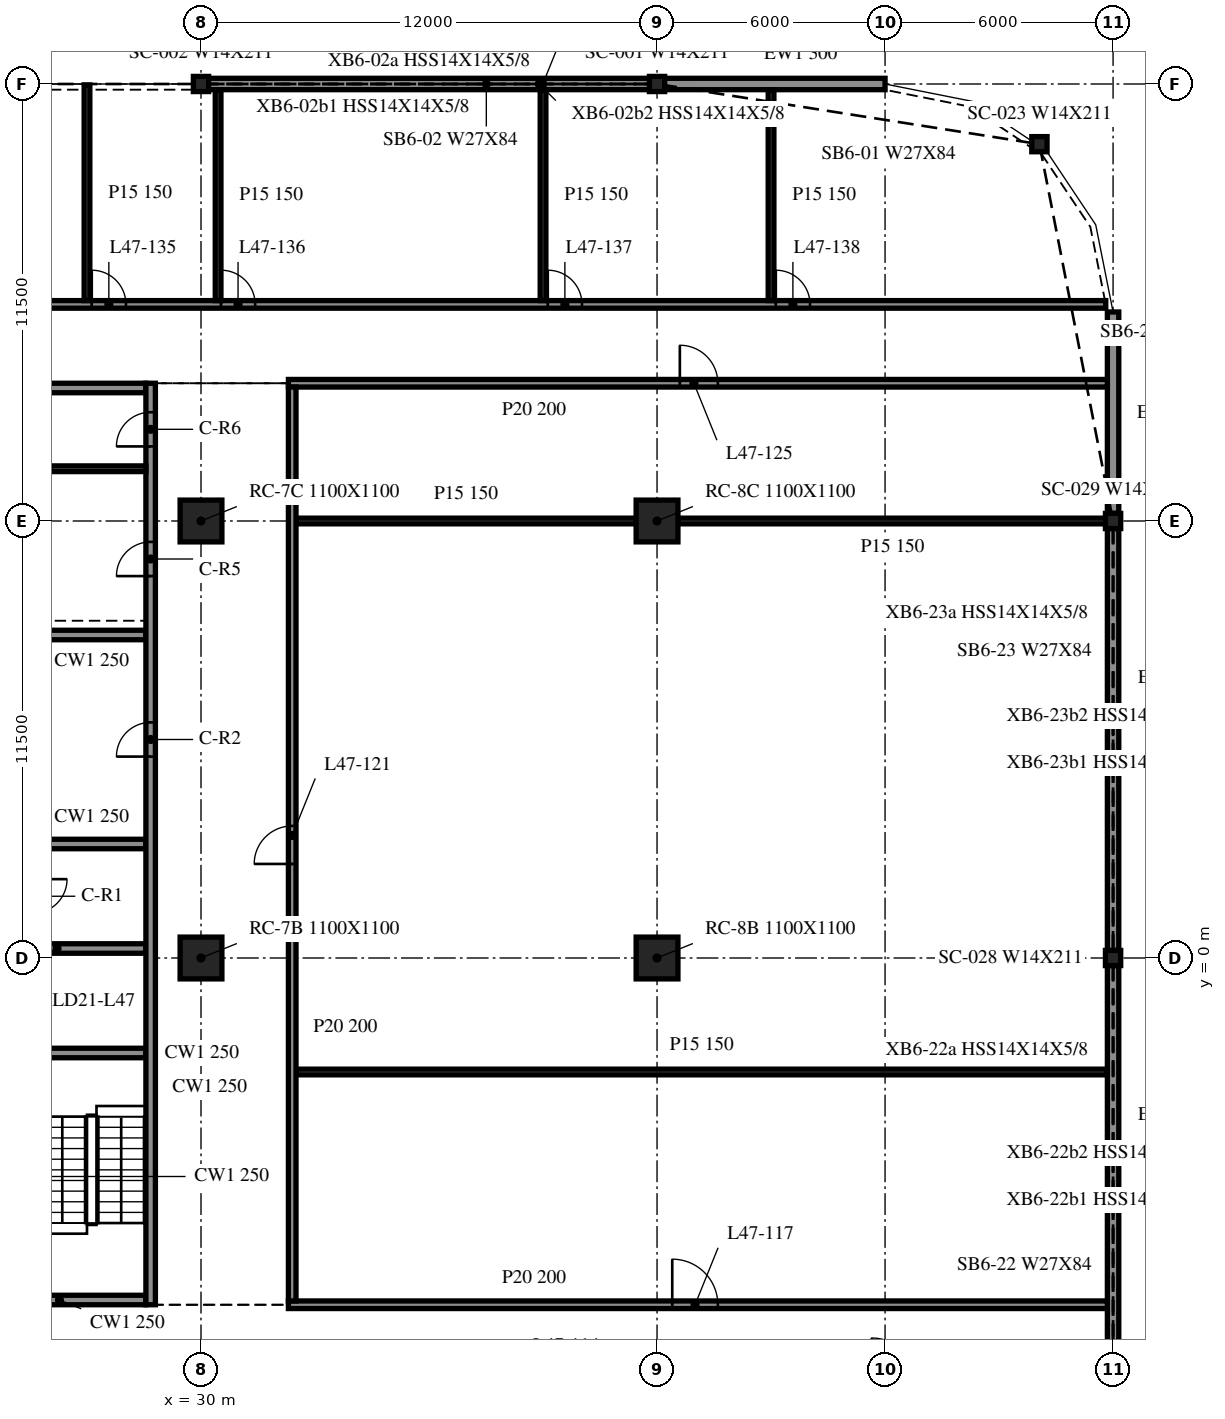
"""IFC4 building model, lengths in metres.
Left out: names, types, materials, properties, quantities, classifications, styles, units other than length and angle.
Written with IfcOpenShell. Run it as: python <this file> out.ifc"""

import sys

from ifc_helpers import new_model, si_unit, direction, frame, frame_2d, origin, origin_2d, place, context, subcontext, project, spatial, rectangle, i_section, extrude, element, fill, save


model = new_model("IFC4")
c1 = context("Model", 3, precision=1e-05, world=origin(), true_north=direction((0.0, 1.0)))
c2 = subcontext(c1, "Body", "Model", "MODEL_VIEW")
j1 = project(units=[si_unit("LENGTHUNIT", "METRE"), si_unit("PLANEANGLEUNIT", "RADIAN")], contexts=[c1])
p1 = place(None, origin())
s1 = spatial("IfcSite", under=j1, at=p1, CompositionType="ELEMENT")
p2 = place(p1, origin())
s2 = spatial("IfcBuilding", under=s1, at=p2, CompositionType="ELEMENT")
p3 = place(p2, frame((0.0, 0.0, 197.7)))
s3 = spatial("IfcBuildingStorey", under=s2, at=p3, CompositionType="ELEMENT", Elevation=197.7)
for number, where, z_axis, x_axis in (
    (1, (30.0, 0.0, -0.34), (0.0, 0.0, 1.0), (1.0, 0.0, 0.0)),
    (2, (30.0, 11.5, -0.34), (0.0, 0.0, 1.0), (1.0, 0.0, 0.0)),
    (3, (42.0, 0.0, -0.34), (0.0, 0.0, 1.0), (1.0, 0.0, 0.0)),
    (4, (42.0, 11.5, -0.34), (0.0, 0.0, 1.0), (1.0, 0.0, 0.0)),
):
    element("IfcColumn", number, at=place(p3, frame(where, z_axis=z_axis, x_axis=x_axis)), inside=s3, PredefinedType="COLUMN", context=c2, shape_type="SweptSolid", body=[
        extrude(rectangle(XDim=1.1, YDim=1.1, at=origin_2d()), origin(), (0.0, 0.0, 1.0), 3.8),
    ])
for number, where, z_axis, x_axis in (
    (5, (52.062, 21.416, -0.34), (0.0, 0.0, 1.0), (1.0, 0.0, 0.0)),
    (6, (42.0, 23.0, -0.34), (0.0, 0.0, 1.0), (1.0, 0.0, 0.0)),
    (7, (30.0, 23.0, -0.34), (0.0, 0.0, 1.0), (1.0, 0.0, 0.0)),
    (8, (54.0, 0.0, -0.34), (0.0, 0.0, 1.0), (1.0, 0.0, 0.0)),
    (9, (54.0, 11.5, -0.34), (0.0, 0.0, 1.0), (1.0, 0.0, 0.0)),
):
    element("IfcColumn", number, at=place(p3, frame(where, z_axis=z_axis, x_axis=x_axis)), inside=s3, PredefinedType="COLUMN", context=c2, shape_type="SweptSolid", body=[
        extrude(i_section(OverallWidth=0.401, OverallDepth=0.399, WebThickness=0.025, FlangeThickness=0.04, at=origin_2d()), origin(), (0.0, 0.0, 1.0), 3.8),
    ])
p4 = place(p3, frame((48.0, 23.0, 0.0), z_axis=(0.0, 0.0, 1.0), x_axis=(-1.0, 0.0, 0.0)))
e10 = element("IfcWall", 10, at=p4, inside=s3, PredefinedType="NOTDEFINED", context=c2, shape_type="SweptSolid", body=[
    extrude(rectangle(XDim=5.988, YDim=0.3, at=frame_2d((2.994, 0.0))), origin(), (0.0, 0.0, 1.0), 2.782),
])
p5 = place(p3, frame((41.988, 23.0, 0.0), z_axis=(0.0, 0.0, 1.0), x_axis=(-1.0, 0.0, 0.0)))
e11 = element("IfcWall", 11, at=p5, inside=s3, PredefinedType="NOTDEFINED", context=c2, shape_type="SweptSolid", body=[
    extrude(rectangle(XDim=11.975, YDim=0.3, at=frame_2d((5.988, 0.0))), origin(), (0.0, 0.0, 1.0), 2.782),
])
for number, where, z_axis, x_axis in (
    (12, (54.0, -11.3, 0.0), (0.0, 0.0, 1.0), (0.0, 1.0, 0.0)),
    (13, (54.0, 0.2, 0.0), (0.0, 0.0, 1.0), (0.0, 1.0, 0.0)),
):
    element("IfcWall", number, at=place(p3, frame(where, z_axis=z_axis, x_axis=x_axis)), inside=s3, PredefinedType="NOTDEFINED", context=c2, shape_type="SweptSolid", body=[
        extrude(rectangle(XDim=11.1, YDim=0.3, at=frame_2d((5.55, 0.0))), origin(), (0.0, 0.0, 1.0), 2.782),
    ])
p6 = place(p3, frame((54.0, 11.7, 0.0), z_axis=(0.0, 0.0, 1.0), x_axis=(0.0, 1.0, 0.0)))
e14 = element("IfcWall", 14, at=p6, inside=s3, PredefinedType="NOTDEFINED", context=c2, shape_type="SweptSolid", body=[
    extrude(rectangle(XDim=5.3, YDim=0.3, at=frame_2d((2.65, 0.0))), origin(), (0.0, 0.0, 1.0), 2.782),
])
p7 = place(p3, frame((28.675, -9.125, 0.0), z_axis=(0.0, 0.0, 1.0), x_axis=(0.0, 1.0, 0.0)))
e15 = element("IfcWall", 15, at=p7, inside=s3, PredefinedType="SOLIDWALL", context=c2, shape_type="SweptSolid", body=[
    extrude(rectangle(XDim=24.25, YDim=0.25, at=frame_2d((12.125, 0.0))), origin(), (0.0, 0.0, 1.0), 3.46),
])
p8 = place(p7, frame((14.425, 0.0, 0.0)))
e16 = element("IfcOpeningElement", 16, at=p8, cuts=e15, PredefinedType="OPENING", context=c2, shape_type="SweptSolid", body=[
    extrude(rectangle(XDim=0.9, YDim=2.1, at=frame_2d((0.45, 1.05))), frame((0.0, 0.135, 0.0), z_axis=(0.0, -1.0, 0.0), x_axis=(1.0, 0.0, 0.0)), (0.0, 0.0, 1.0), 0.27),
])
p9 = place(p7, frame((19.175, 0.0, 0.0)))
e17 = element("IfcOpeningElement", 17, at=p9, cuts=e15, PredefinedType="OPENING", context=c2, shape_type="SweptSolid", body=[
    extrude(rectangle(XDim=0.9, YDim=2.1, at=frame_2d((0.45, 1.05))), frame((0.0, 0.135, 0.0), z_axis=(0.0, -1.0, 0.0), x_axis=(1.0, 0.0, 0.0)), (0.0, 0.0, 1.0), 0.27),
])
p10 = place(p7, frame((22.587, 0.0, 0.0)))
e18 = element("IfcOpeningElement", 18, at=p10, cuts=e15, PredefinedType="OPENING", context=c2, shape_type="SweptSolid", body=[
    extrude(rectangle(XDim=0.9, YDim=2.1, at=frame_2d((0.45, 1.05))), frame((0.0, 0.135, 0.0), z_axis=(0.0, -1.0, 0.0), x_axis=(1.0, 0.0, 0.0)), (0.0, 0.0, 1.0), 0.27),
])
p11 = place(p3, frame((28.55, -9.0, 0.0), z_axis=(0.0, 0.0, 1.0), x_axis=(-1.0, 0.0, 0.0)))
e19 = element("IfcWall", 19, at=p11, inside=s3, PredefinedType="SOLIDWALL", context=c2, shape_type="SweptSolid", body=[
    extrude(rectangle(XDim=9.1, YDim=0.25, at=frame_2d((4.55, 0.0))), origin(), (0.0, 0.0, 1.0), 3.46),
])
p12 = place(p11, frame((3.65, 0.0, 0.0)))
e20 = element("IfcOpeningElement", 20, at=p12, cuts=e19, PredefinedType="OPENING", context=c2, shape_type="SweptSolid", body=[
    extrude(rectangle(XDim=1.8, YDim=2.1, at=frame_2d((0.9, 1.05))), frame((0.0, 0.135, 0.0), z_axis=(0.0, -1.0, 0.0), x_axis=(1.0, 0.0, 0.0)), (0.0, 0.0, 1.0), 0.27),
])
p13 = place(p3, frame((19.45, 15.0, 0.0), z_axis=(0.0, 0.0, 1.0), x_axis=(1.0, 0.0, 0.0)))
e21 = element("IfcWall", 21, at=p13, inside=s3, PredefinedType="SOLIDWALL", context=c2, shape_type="SweptSolid", body=[
    extrude(rectangle(XDim=9.1, YDim=0.25, at=frame_2d((4.55, 0.0))), origin(), (0.0, 0.0, 1.0), 3.46),
])
p14 = place(p13, frame((3.65, 0.0, 0.0)))
e22 = element("IfcOpeningElement", 22, at=p14, cuts=e21, PredefinedType="OPENING", context=c2, shape_type="SweptSolid", body=[
    extrude(rectangle(XDim=1.8, YDim=2.1, at=frame_2d((0.9, 1.05))), frame((0.0, 0.135, 0.0), z_axis=(0.0, -1.0, 0.0), x_axis=(1.0, 0.0, 0.0)), (0.0, 0.0, 1.0), 0.27),
])
for number, where, z_axis, x_axis in (
    (23, (25.7, -2.5, 0.0), (0.0, 0.0, 1.0), (1.0, 0.0, 0.0)),
    (24, (25.7, 0.25, 0.0), (0.0, 0.0, 1.0), (1.0, 0.0, 0.0)),
    (25, (25.7, 3.0, 0.0), (0.0, 0.0, 1.0), (1.0, 0.0, 0.0)),
    (26, (25.7, 8.5, 0.0), (0.0, 0.0, 1.0), (1.0, 0.0, 0.0)),
):
    element("IfcWall", number, at=place(p3, frame(where, z_axis=z_axis, x_axis=x_axis)), inside=s3, PredefinedType="SOLIDWALL", context=c2, shape_type="SweptSolid", body=[
        extrude(rectangle(XDim=2.85, YDim=0.25, at=frame_2d((1.425, 0.0))), origin(), (0.0, 0.0, 1.0), 3.46),
    ])
p15 = place(p3, frame((25.7, 12.875, 0.0), z_axis=(0.0, 0.0, 1.0), x_axis=(1.0, 0.0, 0.0)))
e27 = element("IfcWall", 27, at=p15, inside=s3, PredefinedType="PARTITIONING", context=c2, shape_type="SweptSolid", body=[
    extrude(rectangle(XDim=2.85, YDim=0.15, at=frame_2d((1.425, 0.0))), origin(), (0.0, 0.0, 1.0), 3.46),
])
p16 = place(p3, frame((32.3, -9.125, 0.0), z_axis=(0.0, 0.0, 1.0), x_axis=(1.0, 0.0, 0.0)))
e28 = element("IfcWall", 28, at=p16, inside=s3, PredefinedType="PARTITIONING", context=c2, shape_type="SweptSolid", body=[
    extrude(rectangle(XDim=21.55, YDim=0.2, at=frame_2d((10.775, 0.0))), origin(), (0.0, 0.0, 1.0), 3.46),
])
p17 = place(p16, frame((10.1, 0.0, 0.0)))
e29 = element("IfcOpeningElement", 29, at=p17, cuts=e28, PredefinedType="OPENING", context=c2, shape_type="SweptSolid", body=[
    extrude(rectangle(XDim=1.2, YDim=2.1, at=frame_2d((0.6, 1.05))), frame((0.0, 0.11, 0.0), z_axis=(0.0, -1.0, 0.0), x_axis=(1.0, 0.0, 0.0)), (0.0, 0.0, 1.0), 0.22),
])
p18 = place(p3, frame((32.5, -3.0, 0.0), z_axis=(0.0, 0.0, 1.0), x_axis=(1.0, 0.0, 0.0)))
e30 = element("IfcWall", 30, at=p18, inside=s3, PredefinedType="PARTITIONING", context=c2, shape_type="SweptSolid", body=[
    extrude(rectangle(XDim=21.35, YDim=0.15, at=frame_2d((10.675, 0.0))), origin(), (0.0, 0.0, 1.0), 3.46),
])
p19 = place(p3, frame((32.5, 11.5, 0.0), z_axis=(0.0, 0.0, 1.0), x_axis=(1.0, 0.0, 0.0)))
e31 = element("IfcWall", 31, at=p19, inside=s3, PredefinedType="PARTITIONING", context=c2, shape_type="SweptSolid", body=[
    extrude(rectangle(XDim=8.95, YDim=0.15, at=frame_2d((4.475, 0.0))), origin(), (0.0, 0.0, 1.0), 3.46),
])
p20 = place(p3, frame((42.55, 11.5, 0.0), z_axis=(0.0, 0.0, 1.0), x_axis=(1.0, 0.0, 0.0)))
e32 = element("IfcWall", 32, at=p20, inside=s3, PredefinedType="PARTITIONING", context=c2, shape_type="SweptSolid", body=[
    extrude(rectangle(XDim=11.3, YDim=0.15, at=frame_2d((5.65, 0.0))), origin(), (0.0, 0.0, 1.0), 3.46),
])
p21 = place(p3, frame((32.3, 15.125, 0.0), z_axis=(0.0, 0.0, 1.0), x_axis=(1.0, 0.0, 0.0)))
e33 = element("IfcWall", 33, at=p21, inside=s3, PredefinedType="PARTITIONING", context=c2, shape_type="SweptSolid", body=[
    extrude(rectangle(XDim=21.55, YDim=0.2, at=frame_2d((10.775, 0.0))), origin(), (0.0, 0.0, 1.0), 3.46),
])
p22 = place(p21, frame((10.3, 0.0, 0.0)))
e34 = element("IfcOpeningElement", 34, at=p22, cuts=e33, PredefinedType="OPENING", context=c2, shape_type="SweptSolid", body=[
    extrude(rectangle(XDim=1.0, YDim=2.1, at=frame_2d((0.5, 1.05))), frame((0.0, 0.11, 0.0), z_axis=(0.0, -1.0, 0.0), x_axis=(1.0, 0.0, 0.0)), (0.0, 0.0, 1.0), 0.22),
])
p23 = place(p3, frame((-41.975, 17.2, 0.0), z_axis=(0.0, 0.0, 1.0), x_axis=(1.0, 0.0, 0.0)))
e35 = element("IfcWall", 35, at=p23, inside=s3, PredefinedType="PARTITIONING", context=c2, shape_type="SweptSolid", body=[
    extrude(rectangle(XDim=95.782, YDim=0.2, at=frame_2d((47.891, 0.0))), origin(), (0.0, 0.0, 1.0), 3.46),
])
p24 = place(p23, frame((7.7, 0.0, 0.0)))
e36 = element("IfcOpeningElement", 36, at=p24, cuts=e35, PredefinedType="OPENING", context=c2, shape_type="SweptSolid", body=[
    extrude(rectangle(XDim=0.9, YDim=2.1, at=frame_2d((0.45, 1.05))), frame((0.0, 0.11, 0.0), z_axis=(0.0, -1.0, 0.0), x_axis=(1.0, 0.0, 0.0)), (0.0, 0.0, 1.0), 0.22),
])
p25 = place(p23, frame((13.7, 0.0, 0.0)))
e37 = element("IfcOpeningElement", 37, at=p25, cuts=e35, PredefinedType="OPENING", context=c2, shape_type="SweptSolid", body=[
    extrude(rectangle(XDim=0.9, YDim=2.1, at=frame_2d((0.45, 1.05))), frame((0.0, 0.11, 0.0), z_axis=(0.0, -1.0, 0.0), x_axis=(1.0, 0.0, 0.0)), (0.0, 0.0, 1.0), 0.22),
])
p26 = place(p23, frame((19.7, 0.0, 0.0)))
e38 = element("IfcOpeningElement", 38, at=p26, cuts=e35, PredefinedType="OPENING", context=c2, shape_type="SweptSolid", body=[
    extrude(rectangle(XDim=0.9, YDim=2.1, at=frame_2d((0.45, 1.05))), frame((0.0, 0.11, 0.0), z_axis=(0.0, -1.0, 0.0), x_axis=(1.0, 0.0, 0.0)), (0.0, 0.0, 1.0), 0.22),
])
p27 = place(p23, frame((31.7, 0.0, 0.0)))
e39 = element("IfcOpeningElement", 39, at=p27, cuts=e35, PredefinedType="OPENING", context=c2, shape_type="SweptSolid", body=[
    extrude(rectangle(XDim=0.9, YDim=2.1, at=frame_2d((0.45, 1.05))), frame((0.0, 0.11, 0.0), z_axis=(0.0, -1.0, 0.0), x_axis=(1.0, 0.0, 0.0)), (0.0, 0.0, 1.0), 0.22),
])
p28 = place(p23, frame((35.1, 0.0, 0.0)))
e40 = element("IfcOpeningElement", 40, at=p28, cuts=e35, PredefinedType="OPENING", context=c2, shape_type="SweptSolid", body=[
    extrude(rectangle(XDim=0.9, YDim=2.1, at=frame_2d((0.45, 1.05))), frame((0.0, 0.11, 0.0), z_axis=(0.0, -1.0, 0.0), x_axis=(1.0, 0.0, 0.0)), (0.0, 0.0, 1.0), 0.22),
])
p29 = place(p23, frame((43.7, 0.0, 0.0)))
e41 = element("IfcOpeningElement", 41, at=p29, cuts=e35, PredefinedType="OPENING", context=c2, shape_type="SweptSolid", body=[
    extrude(rectangle(XDim=0.9, YDim=2.1, at=frame_2d((0.45, 1.05))), frame((0.0, 0.11, 0.0), z_axis=(0.0, -1.0, 0.0), x_axis=(1.0, 0.0, 0.0)), (0.0, 0.0, 1.0), 0.22),
])
p30 = place(p23, frame((47.3, 0.0, 0.0)))
e42 = element("IfcOpeningElement", 42, at=p30, cuts=e35, PredefinedType="OPENING", context=c2, shape_type="SweptSolid", body=[
    extrude(rectangle(XDim=0.9, YDim=2.1, at=frame_2d((0.45, 1.05))), frame((0.0, 0.11, 0.0), z_axis=(0.0, -1.0, 0.0), x_axis=(1.0, 0.0, 0.0)), (0.0, 0.0, 1.0), 0.22),
])
p31 = place(p23, frame((51.5, 0.0, 0.0)))
e43 = element("IfcOpeningElement", 43, at=p31, cuts=e35, PredefinedType="OPENING", context=c2, shape_type="SweptSolid", body=[
    extrude(rectangle(XDim=0.9, YDim=2.1, at=frame_2d((0.45, 1.05))), frame((0.0, 0.11, 0.0), z_axis=(0.0, -1.0, 0.0), x_axis=(1.0, 0.0, 0.0)), (0.0, 0.0, 1.0), 0.22),
])
p32 = place(p23, frame((57.1, 0.0, 0.0)))
e44 = element("IfcOpeningElement", 44, at=p32, cuts=e35, PredefinedType="OPENING", context=c2, shape_type="SweptSolid", body=[
    extrude(rectangle(XDim=0.9, YDim=2.1, at=frame_2d((0.45, 1.05))), frame((0.0, 0.11, 0.0), z_axis=(0.0, -1.0, 0.0), x_axis=(1.0, 0.0, 0.0)), (0.0, 0.0, 1.0), 0.22),
])
p33 = place(p23, frame((69.1, 0.0, 0.0)))
e45 = element("IfcOpeningElement", 45, at=p33, cuts=e35, PredefinedType="OPENING", context=c2, shape_type="SweptSolid", body=[
    extrude(rectangle(XDim=0.9, YDim=2.1, at=frame_2d((0.45, 1.05))), frame((0.0, 0.11, 0.0), z_axis=(0.0, -1.0, 0.0), x_axis=(1.0, 0.0, 0.0)), (0.0, 0.0, 1.0), 0.22),
])
p34 = place(p23, frame((72.5, 0.0, 0.0)))
e46 = element("IfcOpeningElement", 46, at=p34, cuts=e35, PredefinedType="OPENING", context=c2, shape_type="SweptSolid", body=[
    extrude(rectangle(XDim=0.9, YDim=2.1, at=frame_2d((0.45, 1.05))), frame((0.0, 0.11, 0.0), z_axis=(0.0, -1.0, 0.0), x_axis=(1.0, 0.0, 0.0)), (0.0, 0.0, 1.0), 0.22),
])
p35 = place(p23, frame((81.1, 0.0, 0.0)))
e47 = element("IfcOpeningElement", 47, at=p35, cuts=e35, PredefinedType="OPENING", context=c2, shape_type="SweptSolid", body=[
    extrude(rectangle(XDim=0.9, YDim=2.1, at=frame_2d((0.45, 1.05))), frame((0.0, 0.11, 0.0), z_axis=(0.0, -1.0, 0.0), x_axis=(1.0, 0.0, 0.0)), (0.0, 0.0, 1.0), 0.22),
])
p36 = place(p23, frame((87.1, 0.0, 0.0)))
e48 = element("IfcOpeningElement", 48, at=p36, cuts=e35, PredefinedType="OPENING", context=c2, shape_type="SweptSolid", body=[
    extrude(rectangle(XDim=0.9, YDim=2.1, at=frame_2d((0.45, 1.05))), frame((0.0, 0.11, 0.0), z_axis=(0.0, -1.0, 0.0), x_axis=(1.0, 0.0, 0.0)), (0.0, 0.0, 1.0), 0.22),
])
p37 = place(p3, frame((27.0, 17.3, 0.0), z_axis=(0.0, 0.0, 1.0), x_axis=(0.0, 1.0, 0.0)))
e49 = element("IfcWall", 49, at=p37, inside=s3, PredefinedType="PARTITIONING", context=c2, shape_type="SweptSolid", body=[
    extrude(rectangle(XDim=5.675, YDim=0.15, at=frame_2d((2.837, 0.0))), origin(), (0.0, 0.0, 1.0), 3.46),
])
p38 = place(p3, frame((30.45, 17.3, 0.0), z_axis=(0.0, 0.0, 1.0), x_axis=(0.0, 1.0, 0.0)))
e50 = element("IfcWall", 50, at=p38, inside=s3, PredefinedType="PARTITIONING", context=c2, shape_type="SweptSolid", body=[
    extrude(rectangle(XDim=5.55, YDim=0.15, at=frame_2d((2.775, 0.0))), origin(), (0.0, 0.0, 1.0), 3.46),
])
p39 = place(p3, frame((32.4, -9.025, 0.0), z_axis=(0.0, 0.0, 1.0), x_axis=(0.0, 1.0, 0.0)))
e51 = element("IfcWall", 51, at=p39, inside=s3, PredefinedType="PARTITIONING", context=c2, shape_type="SweptSolid", body=[
    extrude(rectangle(XDim=24.05, YDim=0.2, at=frame_2d((12.025, 0.0))), origin(), (0.0, 0.0, 1.0), 3.46),
])
p40 = place(p39, frame((11.5, 0.0, 0.0)))
e52 = element("IfcOpeningElement", 52, at=p40, cuts=e51, PredefinedType="OPENING", context=c2, shape_type="SweptSolid", body=[
    extrude(rectangle(XDim=1.0, YDim=2.1, at=frame_2d((0.5, 1.05))), frame((0.0, 0.11, 0.0), z_axis=(0.0, -1.0, 0.0), x_axis=(1.0, 0.0, 0.0)), (0.0, 0.0, 1.0), 0.22),
])
for number, where, z_axis, x_axis in (
    (53, (39.0, 17.3, 0.0), (0.0, 0.0, 1.0), (0.0, 1.0, 0.0)),
    (54, (45.0, 17.3, 0.0), (0.0, 0.0, 1.0), (0.0, 1.0, 0.0)),
):
    element("IfcWall", number, at=place(p3, frame(where, z_axis=z_axis, x_axis=x_axis)), inside=s3, PredefinedType="PARTITIONING", context=c2, shape_type="SweptSolid", body=[
        extrude(rectangle(XDim=5.55, YDim=0.15, at=frame_2d((2.775, 0.0))), origin(), (0.0, 0.0, 1.0), 3.46),
    ])
p41 = place(p8, origin())
e55 = element("IfcDoor", 55, at=p41, inside=s3, OperationType="SINGLE_SWING_RIGHT", PredefinedType="DOOR", context=c2, shape_type="SweptSolid", body=[
    extrude(rectangle(XDim=0.9, YDim=2.1, at=frame_2d((0.45, 1.05))), frame((0.0, 0.025, 0.0), z_axis=(0.0, -1.0, 0.0), x_axis=(1.0, 0.0, 0.0)), (0.0, 0.0, 1.0), 0.05),
])
fill(e16, e55)
p42 = place(p9, origin())
e56 = element("IfcDoor", 56, at=p42, inside=s3, OperationType="SINGLE_SWING_LEFT", PredefinedType="DOOR", context=c2, shape_type="SweptSolid", body=[
    extrude(rectangle(XDim=0.9, YDim=2.1, at=frame_2d((0.45, 1.05))), frame((0.0, 0.025, 0.0), z_axis=(0.0, -1.0, 0.0), x_axis=(1.0, 0.0, 0.0)), (0.0, 0.0, 1.0), 0.05),
])
fill(e17, e56)
p43 = place(p10, origin())
e57 = element("IfcDoor", 57, at=p43, inside=s3, OperationType="SINGLE_SWING_RIGHT", PredefinedType="DOOR", context=c2, shape_type="SweptSolid", body=[
    extrude(rectangle(XDim=0.9, YDim=2.1, at=frame_2d((0.45, 1.05))), frame((0.0, 0.025, 0.0), z_axis=(0.0, -1.0, 0.0), x_axis=(1.0, 0.0, 0.0)), (0.0, 0.0, 1.0), 0.05),
])
fill(e18, e57)
p44 = place(p17, origin())
e58 = element("IfcDoor", 58, at=p44, inside=s3, OperationType="SINGLE_SWING_LEFT", PredefinedType="DOOR", context=c2, shape_type="SweptSolid", body=[
    extrude(rectangle(XDim=1.2, YDim=2.1, at=frame_2d((0.6, 1.05))), frame((0.0, 0.025, 0.0), z_axis=(0.0, -1.0, 0.0), x_axis=(1.0, 0.0, 0.0)), (0.0, 0.0, 1.0), 0.05),
])
fill(e29, e58)
p45 = place(p40, origin())
e59 = element("IfcDoor", 59, at=p45, inside=s3, OperationType="SINGLE_SWING_RIGHT", PredefinedType="DOOR", context=c2, shape_type="SweptSolid", body=[
    extrude(rectangle(XDim=1.0, YDim=2.1, at=frame_2d((0.5, 1.05))), frame((0.0, 0.025, 0.0), z_axis=(0.0, -1.0, 0.0), x_axis=(1.0, 0.0, 0.0)), (0.0, 0.0, 1.0), 0.05),
])
fill(e52, e59)
p46 = place(p22, origin())
e60 = element("IfcDoor", 60, at=p46, inside=s3, OperationType="SINGLE_SWING_LEFT", PredefinedType="DOOR", context=c2, shape_type="SweptSolid", body=[
    extrude(rectangle(XDim=1.0, YDim=2.1, at=frame_2d((0.5, 1.05))), frame((0.0, 0.025, 0.0), z_axis=(0.0, -1.0, 0.0), x_axis=(1.0, 0.0, 0.0)), (0.0, 0.0, 1.0), 0.05),
])
fill(e34, e60)
p47 = place(p33, origin())
e61 = element("IfcDoor", 61, at=p47, inside=s3, OperationType="SINGLE_SWING_RIGHT", PredefinedType="DOOR", context=c2, shape_type="SweptSolid", body=[
    extrude(rectangle(XDim=0.9, YDim=2.1, at=frame_2d((0.45, 1.05))), frame((0.0, 0.025, 0.0), z_axis=(0.0, -1.0, 0.0), x_axis=(1.0, 0.0, 0.0)), (0.0, 0.0, 1.0), 0.05),
])
fill(e45, e61)
p48 = place(p34, origin())
e62 = element("IfcDoor", 62, at=p48, inside=s3, OperationType="SINGLE_SWING_RIGHT", PredefinedType="DOOR", context=c2, shape_type="SweptSolid", body=[
    extrude(rectangle(XDim=0.9, YDim=2.1, at=frame_2d((0.45, 1.05))), frame((0.0, 0.025, 0.0), z_axis=(0.0, -1.0, 0.0), x_axis=(1.0, 0.0, 0.0)), (0.0, 0.0, 1.0), 0.05),
])
fill(e46, e62)
p49 = place(p35, origin())
e63 = element("IfcDoor", 63, at=p49, inside=s3, OperationType="SINGLE_SWING_RIGHT", PredefinedType="DOOR", context=c2, shape_type="SweptSolid", body=[
    extrude(rectangle(XDim=0.9, YDim=2.1, at=frame_2d((0.45, 1.05))), frame((0.0, 0.025, 0.0), z_axis=(0.0, -1.0, 0.0), x_axis=(1.0, 0.0, 0.0)), (0.0, 0.0, 1.0), 0.05),
])
fill(e47, e63)
p50 = place(p36, origin())
e64 = element("IfcDoor", 64, at=p50, inside=s3, OperationType="SINGLE_SWING_RIGHT", PredefinedType="DOOR", context=c2, shape_type="SweptSolid", body=[
    extrude(rectangle(XDim=0.9, YDim=2.1, at=frame_2d((0.45, 1.05))), frame((0.0, 0.025, 0.0), z_axis=(0.0, -1.0, 0.0), x_axis=(1.0, 0.0, 0.0)), (0.0, 0.0, 1.0), 0.05),
])
fill(e48, e64)
save(model, sys.argv[1])
